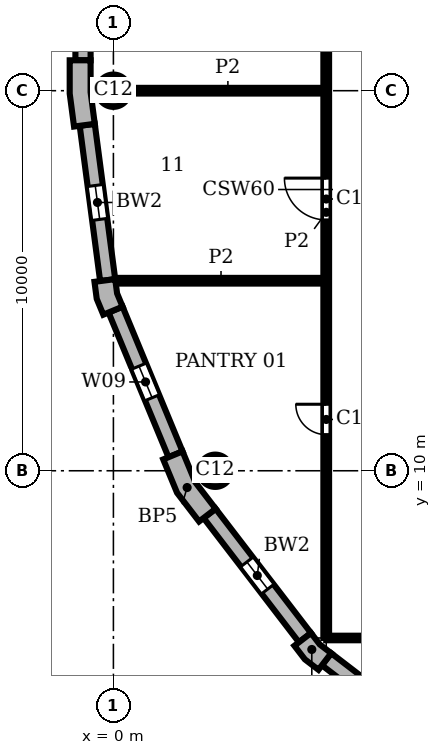
"""IFC4 building model, lengths in metres.
Left out: names, types, materials, properties, quantities, classifications, styles, units other than length and angle.
Written with IfcOpenShell. Run it as: python <this file> out.ifc"""

import sys

from ifc_helpers import new_model, si_unit, direction, frame, frame_2d, origin, origin_2d, place, context, subcontext, project, spatial, polyline, rectangle, circle, outline, extrude, element, fill, save


model = new_model("IFC4")
c1 = context("Model", 3, precision=1e-05, world=origin(), true_north=direction((0.0, 1.0)))
c2 = subcontext(c1, "Body", "Model", "MODEL_VIEW")
j1 = project(units=[si_unit("LENGTHUNIT", "METRE"), si_unit("PLANEANGLEUNIT", "RADIAN")], contexts=[c1])
p1 = place(None, origin())
s1 = spatial("IfcSite", under=j1, at=p1, CompositionType="ELEMENT")
p2 = place(p1, origin())
s2 = spatial("IfcBuilding", under=s1, at=p2, CompositionType="ELEMENT")
p3 = place(p2, frame((0.0, 0.0, 348.9)))
s3 = spatial("IfcBuildingStorey", under=s2, at=p3, CompositionType="ELEMENT", Elevation=348.9)
for number, where, z_axis, x_axis in (
    (1, (0.0, 20.0, 0.0), (0.0, 0.0, 1.0), (1.0, 0.0, 0.0)),
    (2, (2.679, 10.0, 0.0), (0.0, 0.0, 1.0), (1.0, 0.0, 0.0)),
):
    element("IfcColumn", number, at=place(p3, frame(where, z_axis=z_axis, x_axis=x_axis)), inside=s3, PredefinedType="COLUMN", context=c2, shape_type="SweptSolid", body=[
        extrude(circle(Radius=0.425, at=origin_2d()), origin(), (0.0, 0.0, 1.0), 3.9),
    ])
p4 = place(p3, origin())
e3 = element("IfcWall", 3, at=p4, inside=s3, PredefinedType="SOLIDWALL", context=c2, shape_type="SweptSolid", body=[
    extrude(outline(polyline([(-1.0, 20.8), (-1.15, 20.8), (-1.15, 19.925), (-1.036, 19.057), (-0.887, 19.076), (-0.49, 19.128), (-0.6, 19.961), (-0.6, 20.8), (-1.0, 20.8)])), origin(), (0.0, 0.0, 1.0), 3.9),
])
e4 = element("IfcWall", 4, at=p4, inside=s3, PredefinedType="SOLIDWALL", context=c2, shape_type="SweptSolid", body=[
    extrude(outline(polyline([(-0.349, 14.99), (-0.498, 14.971), (-0.439, 14.523), (-0.266, 14.106), (-0.128, 14.164), (0.242, 14.317), (0.097, 14.667), (0.047, 15.043), (-0.349, 14.99)])), origin(), (0.0, 0.0, 1.0), 3.9),
])
e5 = element("IfcWall", 5, at=p4, inside=s3, PredefinedType="SOLIDWALL", context=c2, shape_type="SweptSolid", body=[
    extrude(outline(polyline([(1.449, 10.356), (1.311, 10.299), (1.675, 9.42), (2.254, 8.665), (2.373, 8.757), (2.69, 9.0), (2.155, 9.698), (1.819, 10.51), (1.449, 10.356)])), origin(), (0.0, 0.0, 1.0), 3.9),
])
e6 = element("IfcWall", 6, at=p4, inside=s3, PredefinedType="SOLIDWALL", context=c2, shape_type="SweptSolid", body=[
    extrude(outline(polyline([(4.882, 5.487), (4.763, 5.396), (5.038, 5.038), (5.396, 4.763), (5.487, 4.882), (5.731, 5.199), (5.43, 5.43), (5.199, 5.731), (4.882, 5.487)])), origin(), (0.0, 0.0, 1.0), 3.9),
])
p5 = place(p3, frame((-0.8, 39.2, 0.0), z_axis=(0.0, 0.0, 1.0), x_axis=(0.0, -1.0, 0.0)))
e7 = element("IfcWall", 7, at=p5, inside=s3, PredefinedType="SOLIDWALL", context=c2, shape_type="SweptSolid", body=[
    extrude(rectangle(XDim=18.4, YDim=0.4, at=frame_2d((9.2, 0.0))), origin(), (0.0, 0.0, 1.0), 3.9),
])
p6 = place(p5, frame((3.75, 0.0, 0.9)))
e8 = element("IfcOpeningElement", 8, at=p6, cuts=e7, PredefinedType="OPENING", context=c2, shape_type="SweptSolid", body=[
    extrude(rectangle(XDim=0.9, YDim=2.35, at=frame_2d((0.45, 1.175))), frame((0.0, 0.21, 0.0), z_axis=(0.0, -1.0, 0.0), x_axis=(1.0, 0.0, 0.0)), (0.0, 0.0, 1.0), 0.42),
])
p7 = place(p5, frame((13.75, 0.0, 0.9)))
e9 = element("IfcOpeningElement", 9, at=p7, cuts=e7, PredefinedType="OPENING", context=c2, shape_type="SweptSolid", body=[
    extrude(rectangle(XDim=0.9, YDim=2.35, at=frame_2d((0.45, 1.175))), frame((0.0, 0.21, 0.0), z_axis=(0.0, -1.0, 0.0), x_axis=(1.0, 0.0, 0.0)), (0.0, 0.0, 1.0), 0.42),
])
p8 = place(p3, frame((-0.689, 19.102, 0.0), z_axis=(0.0, 0.0, 1.0), x_axis=(0.130514280502, -0.991446429508, 0.0)))
e10 = element("IfcWall", 10, at=p8, inside=s3, PredefinedType="SOLIDWALL", context=c2, shape_type="SweptSolid", body=[
    extrude(rectangle(XDim=4.121, YDim=0.4, at=frame_2d((2.061, 0.0))), origin(), (0.0, 0.0, 1.0), 3.9),
])
p9 = place(p8, frame((1.611, 0.0, 0.9)))
e11 = element("IfcOpeningElement", 11, at=p9, cuts=e10, PredefinedType="OPENING", context=c2, shape_type="SweptSolid", body=[
    extrude(rectangle(XDim=0.9, YDim=2.35, at=frame_2d((0.45, 1.175))), frame((0.0, 0.21, 0.0), z_axis=(0.0, -1.0, 0.0), x_axis=(1.0, 0.0, 0.0)), (0.0, 0.0, 1.0), 0.42),
])
p10 = place(p3, frame((0.057, 14.24, 0.0), z_axis=(0.0, 0.0, 1.0), x_axis=(0.382721546029, -0.923863744394, 0.0)))
e12 = element("IfcWall", 12, at=p10, inside=s3, PredefinedType="SOLIDWALL", context=c2, shape_type="SweptSolid", body=[
    extrude(rectangle(XDim=4.121, YDim=0.4, at=frame_2d((2.061, 0.0))), origin(), (0.0, 0.0, 1.0), 3.9),
])
p11 = place(p10, frame((1.611, 0.0, 0.9)))
e13 = element("IfcOpeningElement", 13, at=p11, cuts=e12, PredefinedType="OPENING", context=c2, shape_type="SweptSolid", body=[
    extrude(rectangle(XDim=0.9, YDim=2.35, at=frame_2d((0.45, 1.175))), frame((0.0, 0.21, 0.0), z_axis=(0.0, -1.0, 0.0), x_axis=(1.0, 0.0, 0.0)), (0.0, 0.0, 1.0), 0.42),
])
p12 = place(p3, frame((2.532, 8.878, 0.0), z_axis=(0.0, 0.0, 1.0), x_axis=(0.608759824817, -0.793354571229, 0.0)))
e14 = element("IfcWall", 14, at=p12, inside=s3, PredefinedType="SOLIDWALL", context=c2, shape_type="SweptSolid", body=[
    extrude(rectangle(XDim=4.121, YDim=0.4, at=frame_2d((2.061, 0.0))), origin(), (0.0, 0.0, 1.0), 3.9),
])
p13 = place(p12, frame((1.611, 0.0, 0.9)))
e15 = element("IfcOpeningElement", 15, at=p13, cuts=e14, PredefinedType="OPENING", context=c2, shape_type="SweptSolid", body=[
    extrude(rectangle(XDim=0.9, YDim=2.35, at=frame_2d((0.45, 1.175))), frame((0.0, 0.21, 0.0), z_axis=(0.0, -1.0, 0.0), x_axis=(1.0, 0.0, 0.0)), (0.0, 0.0, 1.0), 0.42),
])
p14 = place(p3, frame((5.609, 5.041, 0.0), z_axis=(0.0, 0.0, 1.0), x_axis=(0.793354571229, -0.608759824817, 0.0)))
e16 = element("IfcWall", 16, at=p14, inside=s3, PredefinedType="SOLIDWALL", context=c2, shape_type="SweptSolid", body=[
    extrude(rectangle(XDim=4.121, YDim=0.4, at=frame_2d((2.061, 0.0))), origin(), (0.0, 0.0, 1.0), 3.9),
])
p15 = place(p14, frame((1.611, 0.0, 0.9)))
e17 = element("IfcOpeningElement", 17, at=p15, cuts=e16, PredefinedType="OPENING", context=c2, shape_type="SweptSolid", body=[
    extrude(rectangle(XDim=0.9, YDim=2.35, at=frame_2d((0.45, 1.175))), frame((0.0, 0.21, 0.0), z_axis=(0.0, -1.0, 0.0), x_axis=(1.0, 0.0, 0.0)), (0.0, 0.0, 1.0), 0.42),
])
p16 = place(p3, frame((5.6, 5.6, 0.0), z_axis=(0.0, 0.0, 1.0), x_axis=(0.0, 1.0, 0.0)))
e18 = element("IfcWall", 18, at=p16, inside=s3, PredefinedType="PARTITIONING", context=c2, shape_type="SweptSolid", body=[
    extrude(rectangle(XDim=22.4, YDim=0.15, at=frame_2d((11.2, 0.0))), origin(), (0.0, 0.0, 1.0), 3.45),
])
p17 = place(p16, frame((5.35, 0.0, 0.0)))
e19 = element("IfcOpeningElement", 19, at=p17, cuts=e18, PredefinedType="OPENING", context=c2, shape_type="SweptSolid", body=[
    extrude(rectangle(XDim=0.8, YDim=2.1, at=frame_2d((0.4, 1.05))), frame((0.0, 0.085, 0.0), z_axis=(0.0, -1.0, 0.0), x_axis=(1.0, 0.0, 0.0)), (0.0, 0.0, 1.0), 0.17),
])
p18 = place(p16, frame((11.0, 0.0, 0.0)))
e20 = element("IfcOpeningElement", 20, at=p18, cuts=e18, PredefinedType="OPENING", context=c2, shape_type="SweptSolid", body=[
    extrude(rectangle(XDim=1.1, YDim=2.1, at=frame_2d((0.55, 1.05))), frame((0.0, 0.085, 0.0), z_axis=(0.0, -1.0, 0.0), x_axis=(1.0, 0.0, 0.0)), (0.0, 0.0, 1.0), 0.17),
])
p19 = place(p3, frame((0.063, 15.0, 0.0), z_axis=(0.0, 0.0, 1.0), x_axis=(1.0, 0.0, 0.0)))
e21 = element("IfcWall", 21, at=p19, inside=s3, PredefinedType="PARTITIONING", context=c2, shape_type="SweptSolid", body=[
    extrude(rectangle(XDim=5.537, YDim=0.15, at=frame_2d((2.769, 0.0))), origin(), (0.0, 0.0, 1.0), 3.45),
])
p20 = place(p3, frame((0.425, 20.0, 0.0), z_axis=(0.0, 0.0, 1.0), x_axis=(1.0, 0.0, 0.0)))
e22 = element("IfcWall", 22, at=p20, inside=s3, PredefinedType="PARTITIONING", context=c2, shape_type="SweptSolid", body=[
    extrude(rectangle(XDim=5.175, YDim=0.15, at=frame_2d((2.587, 0.0))), origin(), (0.0, 0.0, 1.0), 3.45),
])
p21 = place(p3, frame((5.6, 5.6, 0.0), z_axis=(0.0, 0.0, 1.0), x_axis=(1.0, 0.0, 0.0)))
e23 = element("IfcWall", 23, at=p21, inside=s3, PredefinedType="PARTITIONING", context=c2, shape_type="SweptSolid", body=[
    extrude(rectangle(XDim=25.4, YDim=0.12, at=frame_2d((12.7, 0.0))), origin(), (0.0, 0.0, 1.0), 3.45),
])
p22 = place(p21, frame((14.1, 0.0, 0.0)))
e24 = element("IfcOpeningElement", 24, at=p22, cuts=e23, PredefinedType="OPENING", context=c2, shape_type="SweptSolid", body=[
    extrude(rectangle(XDim=1.8, YDim=2.1, at=frame_2d((0.9, 1.05))), frame((0.0, 0.07, 0.0), z_axis=(0.0, -1.0, 0.0), x_axis=(1.0, 0.0, 0.0)), (0.0, 0.0, 1.0), 0.14),
])
p23 = place(p9, origin())
e25 = element("IfcWindow", 25, at=p23, inside=s3, PartitioningType="SINGLE_PANEL", PredefinedType="WINDOW", context=c2, shape_type="SweptSolid", body=[
    extrude(rectangle(XDim=0.9, YDim=2.35, at=frame_2d((0.45, 1.175))), frame((0.0, 0.16, 0.0), z_axis=(0.0, -1.0, 0.0), x_axis=(1.0, 0.0, 0.0)), (0.0, 0.0, 1.0), 0.06),
])
fill(e11, e25)
p24 = place(p11, origin())
e26 = element("IfcWindow", 26, at=p24, inside=s3, PartitioningType="SINGLE_PANEL", PredefinedType="WINDOW", context=c2, shape_type="SweptSolid", body=[
    extrude(rectangle(XDim=0.9, YDim=2.35, at=frame_2d((0.45, 1.175))), frame((0.0, 0.16, 0.0), z_axis=(0.0, -1.0, 0.0), x_axis=(1.0, 0.0, 0.0)), (0.0, 0.0, 1.0), 0.06),
])
fill(e13, e26)
p25 = place(p13, origin())
e27 = element("IfcWindow", 27, at=p25, inside=s3, PartitioningType="SINGLE_PANEL", PredefinedType="WINDOW", context=c2, shape_type="SweptSolid", body=[
    extrude(rectangle(XDim=0.9, YDim=2.35, at=frame_2d((0.45, 1.175))), frame((0.0, 0.16, 0.0), z_axis=(0.0, -1.0, 0.0), x_axis=(1.0, 0.0, 0.0)), (0.0, 0.0, 1.0), 0.06),
])
fill(e15, e27)
p26 = place(p17, origin())
e28 = element("IfcDoor", 28, at=p26, inside=s3, OperationType="SINGLE_SWING_RIGHT", PredefinedType="DOOR", context=c2, shape_type="SweptSolid", body=[
    extrude(rectangle(XDim=0.8, YDim=2.1, at=frame_2d((0.4, 1.05))), frame((0.0, 0.025, 0.0), z_axis=(0.0, -1.0, 0.0), x_axis=(1.0, 0.0, 0.0)), (0.0, 0.0, 1.0), 0.05),
])
fill(e19, e28)
p27 = place(p18, origin())
e29 = element("IfcDoor", 29, at=p27, inside=s3, OperationType="SINGLE_SWING_RIGHT", PredefinedType="DOOR", context=c2, shape_type="SweptSolid", body=[
    extrude(rectangle(XDim=1.1, YDim=2.1, at=frame_2d((0.55, 1.05))), frame((0.0, 0.025, 0.0), z_axis=(0.0, -1.0, 0.0), x_axis=(1.0, 0.0, 0.0)), (0.0, 0.0, 1.0), 0.05),
])
fill(e20, e29)
save(model, sys.argv[1])
